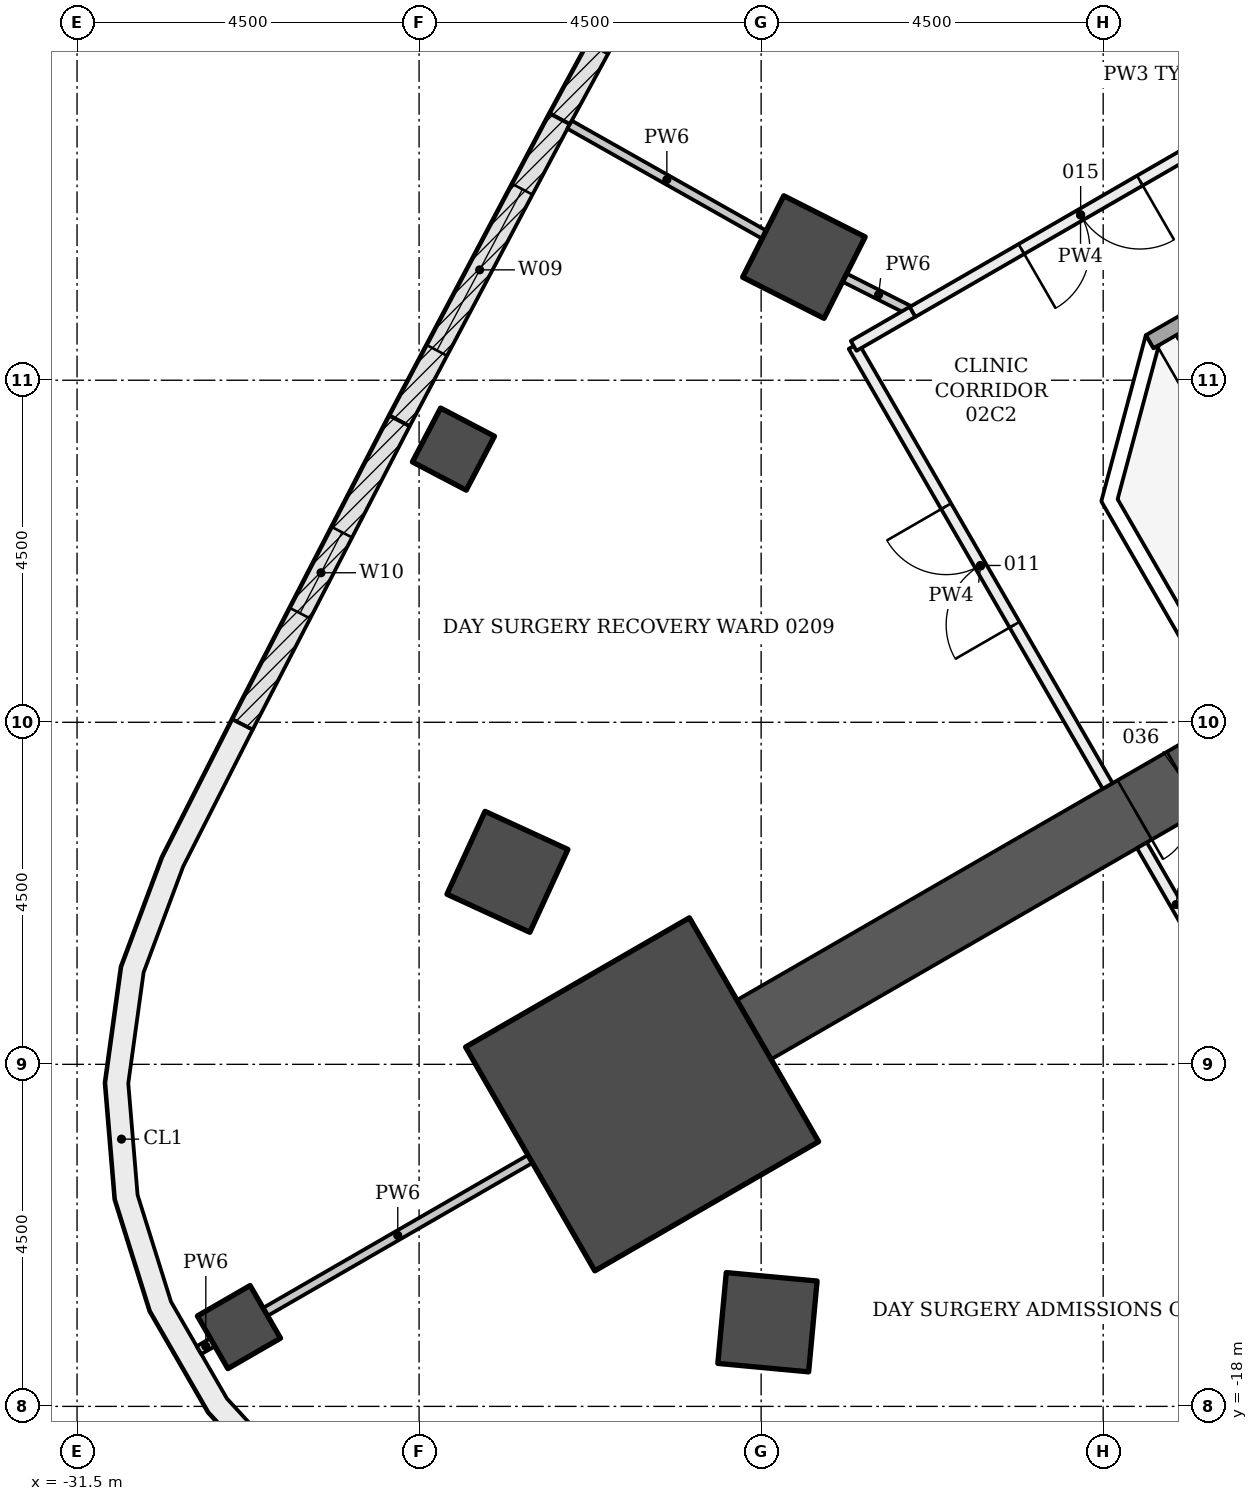
"""IFC4 building model, lengths in metres.
Left out: names, types, materials, properties, quantities, classifications, styles, units other than length and angle.
Written with IfcOpenShell. Run it as: python <this file> out.ifc"""

import sys

from ifc_helpers import new_model, si_unit, direction, frame, frame_2d, origin, origin_2d, place, context, subcontext, project, spatial, polyline, rectangle, outline, extrude, element, fill, save


model = new_model("IFC4")
c1 = context("Model", 3, precision=1e-05, world=origin(), true_north=direction((0.0, 1.0)))
c2 = subcontext(c1, "Body", "Model", "MODEL_VIEW")
j1 = project(units=[si_unit("LENGTHUNIT", "METRE"), si_unit("PLANEANGLEUNIT", "RADIAN")], contexts=[c1])
p1 = place(None, origin())
s1 = spatial("IfcSite", under=j1, at=p1, CompositionType="ELEMENT")
p2 = place(p1, origin())
s2 = spatial("IfcBuilding", under=s1, at=p2, CompositionType="ELEMENT")
p3 = place(p2, frame((0.0, 0.0, 10.5)))
s3 = spatial("IfcBuildingStorey", under=s2, at=p3, CompositionType="ELEMENT", Elevation=10.5)
for number, where, z_axis, x_axis in (
    (1, (-21.937, -2.88, -0.25), (0.0, 0.0, 1.0), (-0.893, 0.451, 0.0)),
    (2, (-25.838, -10.967, -0.25), (0.0, 0.0, 1.0), (-0.909, 0.418, 0.0)),
    (3, (-22.417, -16.893, -0.25), (0.0, 0.0, 1.0), (-0.093, -0.996, 0.0)),
):
    element("IfcColumn", number, at=place(p3, frame(where, z_axis=z_axis, x_axis=x_axis)), inside=s3, PredefinedType="COLUMN", context=c2, shape_type="SweptSolid", body=[
        extrude(rectangle(XDim=1.2, YDim=1.2, at=origin_2d()), origin(), (0.0, 0.0, 1.0), 4.5),
    ])
for number, where, z_axis, x_axis in (
    (4, (-26.548, -5.406, -0.25), (0.0, 0.0, 1.0), (-0.886, 0.464, 0.0)),
    (5, (-29.37, -16.957, -0.25), (0.0, 0.0, 1.0), (-0.866, -0.5, 0.0)),
):
    element("IfcColumn", number, at=place(p3, frame(where, z_axis=z_axis, x_axis=x_axis)), inside=s3, PredefinedType="COLUMN", context=c2, shape_type="SweptSolid", body=[
        extrude(rectangle(XDim=0.8, YDim=0.8, at=origin_2d()), origin(), (0.0, 0.0, 1.0), 4.5),
    ])
p4 = place(p3, frame((-9.922, -5.728, -0.25), z_axis=(0.0, 0.0, 1.0), x_axis=(-0.866028046028, -0.499995423472, 0.0)))
e6 = element("IfcWall", 6, at=p4, inside=s3, PredefinedType="SHEAR", context=c2, shape_type="SweptSolid", body=[
    extrude(rectangle(XDim=14.633, YDim=0.9, at=frame_2d((7.316, 0.0))), origin(), (0.0, 0.0, 1.0), 4.5),
])
p5 = place(p4, frame((7.35, 0.0, 0.25)))
e7 = element("IfcOpeningElement", 7, at=p5, cuts=e6, PredefinedType="OPENING", context=c2, shape_type="SweptSolid", body=[
    extrude(rectangle(XDim=1.5, YDim=2.1, at=frame_2d((0.75, 1.05))), frame((0.0, 0.46, 0.0), z_axis=(0.0, -1.0, 0.0), x_axis=(1.0, 0.0, 0.0)), (0.0, 0.0, 1.0), 0.92),
])
p6 = place(p3, frame((-24.066, -13.895, -0.25), z_axis=(0.0, 0.0, 1.0), x_axis=(-0.866025403784, -0.5, 0.0)))
e8 = element("IfcColumn", 8, at=p6, inside=s3, PredefinedType="COLUMN", context=c2, shape_type="SweptSolid", body=[
    extrude(rectangle(XDim=3.4, YDim=3.4, at=origin_2d()), origin(), (0.0, 0.0, 1.0), 4.5),
])
p7 = place(p3, frame((-25.148, -1.06, 0.0), z_axis=(0.0, 0.0, 1.0), x_axis=(0.477577109439, 0.878589838628, 0.0)))
e9 = element("IfcWall", 9, at=p7, inside=s3, PredefinedType="NOTDEFINED", context=c2, shape_type="SweptSolid", body=[
    extrude(rectangle(XDim=4.496, YDim=0.3, at=frame_2d((2.248, 0.0))), origin(), (0.0, 0.0, 1.0), 4.25),
])
p8 = place(p7, frame((1.048, 0.0, 0.9)))
e10 = element("IfcOpeningElement", 10, at=p8, cuts=e9, PredefinedType="OPENING", context=c2, shape_type="SweptSolid", body=[
    extrude(rectangle(XDim=2.4, YDim=2.4, at=frame_2d((1.2, 1.2))), frame((0.0, 0.16, 0.0), z_axis=(0.0, -1.0, 0.0), x_axis=(1.0, 0.0, 0.0)), (0.0, 0.0, 1.0), 0.32),
])
p9 = place(p3, frame((-27.256, -5.034, 0.0), z_axis=(0.0, 0.0, 1.0), x_axis=(0.468566202388, 0.883428386447, 0.0)))
e11 = element("IfcWall", 11, at=p9, inside=s3, PredefinedType="NOTDEFINED", context=c2, shape_type="SweptSolid", body=[
    extrude(rectangle(XDim=4.496, YDim=0.3, at=frame_2d((2.248, 0.0))), origin(), (0.0, 0.0, 1.0), 4.25),
])
p10 = place(p9, frame((1.048, 0.0, 0.9)))
e12 = element("IfcOpeningElement", 12, at=p10, cuts=e11, PredefinedType="OPENING", context=c2, shape_type="SweptSolid", body=[
    extrude(rectangle(XDim=2.4, YDim=2.4, at=frame_2d((1.2, 1.2))), frame((0.0, 0.16, 0.0), z_axis=(0.0, -1.0, 0.0), x_axis=(1.0, 0.0, 0.0)), (0.0, 0.0, 1.0), 0.32),
])
p11 = place(p3, frame((-29.323, -9.029, 0.0), z_axis=(0.0, 0.0, 1.0), x_axis=(0.459443600121, 0.888206945654, 0.0)))
e13 = element("IfcWall", 13, at=p11, inside=s3, PredefinedType="NOTDEFINED", context=c2, shape_type="SweptSolid", body=[
    extrude(rectangle(XDim=4.496, YDim=0.3, at=frame_2d((2.248, 0.0))), origin(), (0.0, 0.0, 1.0), 4.25),
])
p12 = place(p11, frame((1.648, 0.0, 0.8)))
e14 = element("IfcOpeningElement", 14, at=p12, cuts=e13, PredefinedType="OPENING", context=c2, shape_type="SweptSolid", body=[
    extrude(rectangle(XDim=1.2, YDim=3.0, at=frame_2d((0.6, 1.5))), frame((0.0, 0.16, 0.0), z_axis=(0.0, -1.0, 0.0), x_axis=(1.0, 0.0, 0.0)), (0.0, 0.0, 1.0), 0.32),
])
p13 = place(p3, origin())
e15 = element("IfcWall", 15, at=p13, inside=s3, PredefinedType="NOTDEFINED", context=c2, shape_type="SweptSolid", body=[
    extrude(outline(polyline([(-29.457, -8.962), (-30.379, -10.776), (-30.917, -12.218), (-31.128, -13.742), (-31.0, -15.276), (-30.54, -16.744), (-29.771, -18.077), (-28.729, -19.209), (-27.465, -20.086), (-26.04, -20.666), (-24.522, -20.921), (-22.49, -21.03), (-22.474, -20.73), (-24.489, -20.622), (-25.957, -20.376), (-27.321, -19.821), (-28.531, -18.981), (-29.528, -17.898), (-30.264, -16.623), (-30.704, -15.218), (-30.826, -13.75), (-30.625, -12.292), (-30.104, -10.897), (-29.19, -9.098), (-29.457, -8.962)])), origin(), (0.0, 0.0, 1.0), 4.25),
])
p14 = place(p3, frame((-12.539, -1.194, -0.25), z_axis=(0.0, 0.0, 1.0), x_axis=(-0.866045472092, -0.499965239061, 0.0)))
e16 = element("IfcWall", 16, at=p14, inside=s3, PredefinedType="SHEAR", context=c2, shape_type="SweptSolid", body=[
    extrude(rectangle(XDim=5.6, YDim=0.2, at=frame_2d((2.8, 0.0))), origin(), (0.0, 0.0, 1.0), 4.5),
])
p15 = place(p14, frame((0.45, 0.0, 0.25)))
e17 = element("IfcOpeningElement", 17, at=p15, cuts=e16, PredefinedType="OPENING", context=c2, shape_type="SweptSolid", body=[
    extrude(rectangle(XDim=1.2, YDim=2.1, at=frame_2d((0.6, 1.05))), frame((0.0, 0.11, 0.0), z_axis=(0.0, -1.0, 0.0), x_axis=(1.0, 0.0, 0.0)), (0.0, 0.0, 1.0), 0.22),
])
p16 = place(p3, frame((0.0, 0.0, -0.25)))
e18 = element("IfcWall", 18, at=p16, inside=s3, PredefinedType="SHEAR", context=c2, shape_type="SweptSolid", body=[
    extrude(outline(polyline([(-17.439, -3.907), (-18.025, -6.093), (-16.95, -7.955), (-16.777, -7.855), (-17.81, -6.065), (-17.267, -4.039), (-17.339, -4.081), (-17.339, -4.081), (-17.339, -4.081), (-17.339, -4.081), (-17.339, -4.081), (-17.339, -4.081), (-17.339, -4.081), (-17.339, -4.081), (-17.339, -4.081), (-17.339, -4.081), (-17.339, -4.081), (-17.339, -4.081), (-17.339, -4.081), (-17.339, -4.081), (-17.339, -4.081), (-17.339, -4.081), (-17.339, -4.081), (-17.439, -3.907)])), origin(), (0.0, 0.0, 1.0), 4.5),
])
p17 = place(p3, frame((-16.591, -12.176, 0.0), z_axis=(0.0, 0.0, 1.0), x_axis=(-0.499965372359, 0.866045395139, 0.0)))
e19 = element("IfcWall", 19, at=p17, inside=s3, PredefinedType="PARTITIONING", context=c2, shape_type="SweptSolid", body=[
    extrude(rectangle(XDim=1.798, YDim=0.15, at=frame_2d((0.899, 0.0))), origin(), (0.0, 0.0, 1.0), 3.638),
])
p18 = place(p3, frame((-29.716, -17.157, 0.0), z_axis=(0.0, 0.0, 1.0), x_axis=(-0.865774595023, -0.500434162116, 0.0)))
e20 = element("IfcWall", 20, at=p18, inside=s3, PredefinedType="PARTITIONING", context=c2, shape_type="SweptSolid", body=[
    extrude(rectangle(XDim=0.208, YDim=0.12, at=frame_2d((0.104, 0.0))), origin(), (0.0, 0.0, 1.0), 4.25),
])
p19 = place(p3, frame((-25.538, -14.745, 0.0), z_axis=(0.0, 0.0, 1.0), x_axis=(-0.866027971625, -0.499995552344, 0.0)))
e21 = element("IfcWall", 21, at=p19, inside=s3, PredefinedType="PARTITIONING", context=c2, shape_type="SweptSolid", body=[
    extrude(rectangle(XDim=4.024, YDim=0.12, at=frame_2d((2.012, 0.0))), origin(), (0.0, 0.0, 1.0), 3.717),
])
p20 = place(p3, frame((-17.941, -9.838, 0.0), z_axis=(0.0, 0.0, 1.0), x_axis=(-0.500048140185, 0.865997608252, 0.0)))
e22 = element("IfcWall", 22, at=p20, inside=s3, PredefinedType="PARTITIONING", context=c2, shape_type="SweptSolid", body=[
    extrude(rectangle(XDim=6.683, YDim=0.15, at=frame_2d((3.342, 0.0))), origin(), (0.0, 0.0, 1.0), 3.638),
])
p21 = place(p20, frame((2.45, 0.0, 0.0)))
e23 = element("IfcOpeningElement", 23, at=p21, cuts=e22, PredefinedType="OPENING", context=c2, shape_type="SweptSolid", body=[
    extrude(rectangle(XDim=1.8, YDim=2.1, at=frame_2d((0.9, 1.05))), frame((0.0, 0.085, 0.0), z_axis=(0.0, -1.0, 0.0), x_axis=(1.0, 0.0, 0.0)), (0.0, 0.0, 1.0), 0.17),
])
p22 = place(p3, frame((-21.283, -4.048, 0.0), z_axis=(0.0, 0.0, 1.0), x_axis=(0.865804825377, 0.500381858538, 0.0)))
e24 = element("IfcWall", 24, at=p22, inside=s3, PredefinedType="PARTITIONING", context=c2, shape_type="SweptSolid", body=[
    extrude(rectangle(XDim=0.897, YDim=0.15, at=frame_2d((0.449, 0.0))), origin(), (0.0, 0.0, 1.0), 3.638),
])
p23 = place(p3, frame((-22.461, -2.584, 0.0), z_axis=(0.0, 0.0, 1.0), x_axis=(-0.870620069476, 0.491955988505, 0.0)))
e25 = element("IfcWall", 25, at=p23, inside=s3, PredefinedType="PARTITIONING", context=c2, shape_type="SweptSolid", body=[
    extrude(rectangle(XDim=2.939, YDim=0.12, at=frame_2d((1.47, 0.0))), origin(), (0.0, 0.0, 1.0), 3.633),
])
p24 = place(p3, frame((-20.509, -3.601, 0.0), z_axis=(0.0, 0.0, 1.0), x_axis=(-0.892710007007, 0.450631604961, 0.0)))
e26 = element("IfcWall", 26, at=p24, inside=s3, PredefinedType="PARTITIONING", context=c2, shape_type="SweptSolid", body=[
    extrude(rectangle(XDim=0.999, YDim=0.12, at=frame_2d((0.5, 0.0))), origin(), (0.0, 0.0, 1.0), 3.638),
])
p25 = place(p3, frame((-16.088, -1.049, 0.0), z_axis=(0.0, 0.0, 1.0), x_axis=(-0.866023883975, -0.500002632377, 0.0)))
e27 = element("IfcWall", 27, at=p25, inside=s3, PredefinedType="PARTITIONING", context=c2, shape_type="SweptSolid", body=[
    extrude(rectangle(XDim=5.104, YDim=0.15, at=frame_2d((2.552, 0.0))), origin(), (0.0, 0.0, 1.0), 3.638),
])
p26 = place(p25, frame((1.65, 0.0, 0.0)))
e28 = element("IfcOpeningElement", 28, at=p26, cuts=e27, PredefinedType="OPENING", context=c2, shape_type="SweptSolid", body=[
    extrude(rectangle(XDim=1.8, YDim=2.1, at=frame_2d((0.9, 1.05))), frame((0.0, 0.085, 0.0), z_axis=(0.0, -1.0, 0.0), x_axis=(1.0, 0.0, 0.0)), (0.0, 0.0, 1.0), 0.17),
])
p27 = place(p10, origin())
e29 = element("IfcWindow", 29, at=p27, inside=s3, PartitioningType="DOUBLE_PANEL_VERTICAL", PredefinedType="WINDOW", context=c2, shape_type="SweptSolid", body=[
    extrude(rectangle(XDim=2.4, YDim=2.4, at=frame_2d((1.2, 1.2))), frame((0.0, 0.03, 0.0), z_axis=(0.0, -1.0, 0.0), x_axis=(1.0, 0.0, 0.0)), (0.0, 0.0, 1.0), 0.06),
])
fill(e12, e29)
p28 = place(p12, origin())
e30 = element("IfcWindow", 30, at=p28, inside=s3, PartitioningType="SINGLE_PANEL", PredefinedType="WINDOW", context=c2, shape_type="SweptSolid", body=[
    extrude(rectangle(XDim=1.2, YDim=3.0, at=frame_2d((0.6, 1.5))), frame((0.0, 0.03, 0.0), z_axis=(0.0, -1.0, 0.0), x_axis=(1.0, 0.0, 0.0)), (0.0, 0.0, 1.0), 0.06),
])
fill(e14, e30)
p29 = place(p21, origin())
e31 = element("IfcDoor", 31, at=p29, inside=s3, OperationType="DOUBLE_DOOR_SINGLE_SWING", PredefinedType="DOOR", context=c2, shape_type="SweptSolid", body=[
    extrude(rectangle(XDim=1.8, YDim=2.1, at=frame_2d((0.9, 1.05))), frame((0.0, 0.025, 0.0), z_axis=(0.0, -1.0, 0.0), x_axis=(1.0, 0.0, 0.0)), (0.0, 0.0, 1.0), 0.05),
])
fill(e23, e31)
p30 = place(p26, origin())
e32 = element("IfcDoor", 32, at=p30, inside=s3, OperationType="DOUBLE_DOOR_SINGLE_SWING", PredefinedType="DOOR", context=c2, shape_type="SweptSolid", body=[
    extrude(rectangle(XDim=1.8, YDim=2.1, at=frame_2d((0.9, 1.05))), frame((0.0, 0.025, 0.0), z_axis=(0.0, -1.0, 0.0), x_axis=(1.0, 0.0, 0.0)), (0.0, 0.0, 1.0), 0.05),
])
fill(e28, e32)
p31 = place(p5, origin())
e33 = element("IfcDoor", 33, at=p31, inside=s3, OperationType="DOUBLE_DOOR_SINGLE_SWING", PredefinedType="DOOR", context=c2, shape_type="SweptSolid", body=[
    extrude(rectangle(XDim=1.5, YDim=2.1, at=frame_2d((0.75, 1.05))), frame((0.0, 0.025, 0.0), z_axis=(0.0, -1.0, 0.0), x_axis=(1.0, 0.0, 0.0)), (0.0, 0.0, 1.0), 0.05),
])
fill(e7, e33)
save(model, sys.argv[1])
